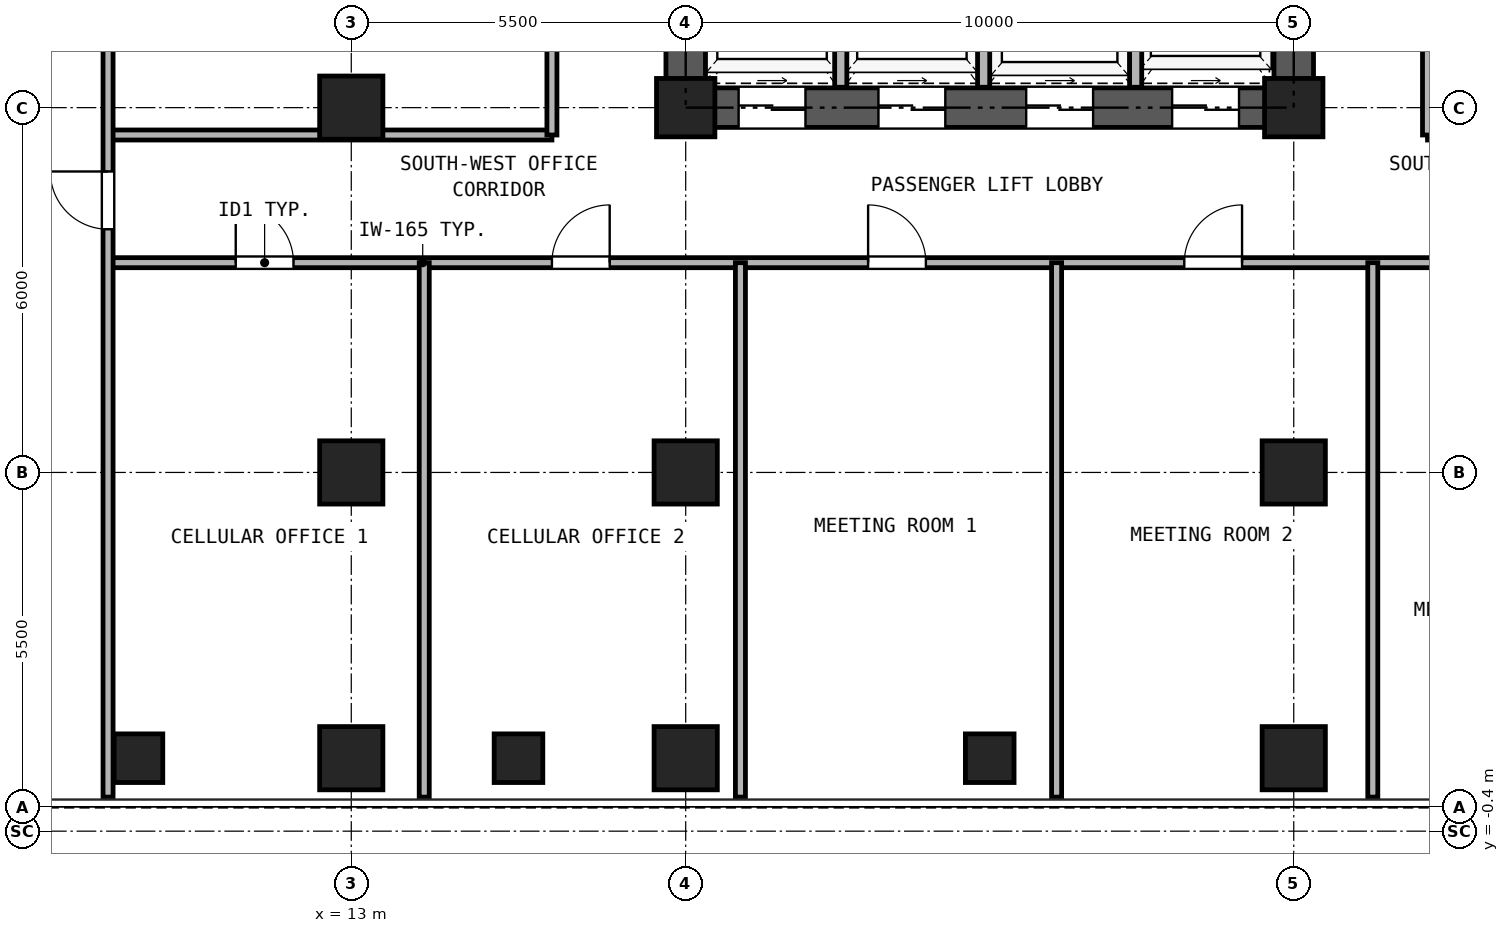
"""IFC4 building model, lengths in metres.
Left out: names, types, materials, properties, quantities, classifications, styles, units other than length and angle.
Written with IfcOpenShell. Run it as: python <this file> out.ifc"""

import sys

from ifc_helpers import new_model, si_unit, direction, frame, frame_2d, origin, origin_2d, place, context, subcontext, project, spatial, rectangle, hollow_rectangle, extrude, source, transform, mapped, element, fill, save


model = new_model("IFC4")
c1 = context("Model", 3, precision=1e-05, world=origin(), true_north=direction((0.0, 1.0)))
c2 = subcontext(c1, "Body", "Model", "MODEL_VIEW")
j1 = project(units=[si_unit("LENGTHUNIT", "METRE"), si_unit("PLANEANGLEUNIT", "RADIAN")], contexts=[c1])
p1 = place(None, origin())
s1 = spatial("IfcSite", under=j1, at=p1, CompositionType="ELEMENT")
p2 = place(p1, origin())
s2 = spatial("IfcBuilding", under=s1, at=p2, CompositionType="ELEMENT")
p3 = place(p2, frame((0.0, 0.0, 54.9)))
s3 = spatial("IfcBuildingStorey", under=s2, at=p3, CompositionType="ELEMENT", Elevation=54.9)
m1 = source(origin(), c2, "Body", "SweptSolid", [
    extrude(hollow_rectangle(XDim=1.04, YDim=1.04, WallThickness=0.065, at=origin_2d()), origin(), (0.0, 0.0, 1.0), 3.32),
])
for number, where, z_axis, x_axis in (
    (1, (13.0, 0.8, 0.0), (0.0, 0.0, 1.0), (1.0, 0.0, 0.0)),
    (2, (18.5, 0.8, 0.0), (0.0, 0.0, 1.0), (1.0, 0.0, 0.0)),
    (3, (28.5, 0.8, 0.0), (0.0, 0.0, 1.0), (1.0, 0.0, 0.0)),
    (4, (13.0, 5.5, 0.0), (0.0, 0.0, 1.0), (1.0, 0.0, 0.0)),
    (5, (13.0, 11.5, 0.0), (0.0, 0.0, 1.0), (1.0, 0.0, 0.0)),
    (6, (18.5, 5.5, 0.0), (0.0, 0.0, 1.0), (1.0, 0.0, 0.0)),
):
    element("IfcColumn", number, at=place(p3, frame(where, z_axis=z_axis, x_axis=x_axis)), inside=s3, PredefinedType="COLUMN", context=c2, shape_type="MappedRepresentation", body=[
        mapped(m1, transform((0.0, 0.0, 0.0), x_axis=(1.0, 0.0, 0.0), y_axis=(0.0, 1.0, 0.0), z_axis=(0.0, 0.0, 1.0), scale=1.0)),
    ])
m2 = source(origin(), c2, "Body", "SweptSolid", [
    extrude(hollow_rectangle(XDim=0.96, YDim=0.96, WallThickness=0.06, at=origin_2d()), origin(), (0.0, 0.0, 1.0), 3.32),
])
p4 = place(p3, frame((18.5, 11.5, 0.0), z_axis=(0.0, 0.0, 1.0), x_axis=(1.0, 0.0, 0.0)))
e7 = element("IfcColumn", 7, at=p4, inside=s3, PredefinedType="COLUMN", context=c2, shape_type="MappedRepresentation", body=[
    mapped(m2, transform((0.0, 0.0, 0.0), x_axis=(1.0, 0.0, 0.0), y_axis=(0.0, 1.0, 0.0), z_axis=(0.0, 0.0, 1.0), scale=1.0)),
])
p5 = place(p3, frame((28.5, 5.5, 0.0), z_axis=(0.0, 0.0, 1.0), x_axis=(1.0, 0.0, 0.0)))
e8 = element("IfcColumn", 8, at=p5, inside=s3, PredefinedType="COLUMN", context=c2, shape_type="MappedRepresentation", body=[
    mapped(m1, transform((0.0, 0.0, 0.0), x_axis=(1.0, 0.0, 0.0), y_axis=(0.0, 1.0, 0.0), z_axis=(0.0, 0.0, 1.0), scale=1.0)),
])
p6 = place(p3, frame((28.5, 11.5, 0.0), z_axis=(0.0, 0.0, 1.0), x_axis=(1.0, 0.0, 0.0)))
e9 = element("IfcColumn", 9, at=p6, inside=s3, PredefinedType="COLUMN", context=c2, shape_type="MappedRepresentation", body=[
    mapped(m2, transform((0.0, 0.0, 0.0), x_axis=(1.0, 0.0, 0.0), y_axis=(0.0, 1.0, 0.0), z_axis=(0.0, 0.0, 1.0), scale=1.0)),
])
m3 = source(origin(), c2, "Body", "SweptSolid", [
    extrude(hollow_rectangle(XDim=0.8, YDim=0.8, WallThickness=0.045, at=origin_2d()), origin(), (0.0, 0.0, 1.0), 3.32),
])
for number, where, z_axis, x_axis in (
    (10, (9.5, 0.8, 0.0), (0.0, 0.0, 1.0), (1.0, 0.0, 0.0)),
    (11, (15.75, 0.8, 0.0), (0.0, 0.0, 1.0), (1.0, 0.0, 0.0)),
    (12, (23.5, 0.8, 0.0), (0.0, 0.0, 1.0), (1.0, 0.0, 0.0)),
):
    element("IfcColumn", number, at=place(p3, frame(where, z_axis=z_axis, x_axis=x_axis)), inside=s3, PredefinedType="COLUMN", context=c2, shape_type="MappedRepresentation", body=[
        mapped(m3, transform((0.0, 0.0, 0.0), x_axis=(1.0, 0.0, 0.0), y_axis=(0.0, 1.0, 0.0), z_axis=(0.0, 0.0, 1.0), scale=1.0)),
    ])
p7 = place(p3, frame((18.175, 11.5, 0.0), z_axis=(0.0, 0.0, 1.0), x_axis=(1.0, 0.0, 0.0)))
e13 = element("IfcWall", 13, at=p7, inside=s3, PredefinedType="SHEAR", context=c2, shape_type="SweptSolid", body=[
    extrude(rectangle(XDim=10.65, YDim=0.65, at=frame_2d((5.325, 0.0))), origin(), (0.0, 0.0, 1.0), 3.32),
])
p8 = place(p7, frame((1.195, 0.0, 0.0)))
e14 = element("IfcOpeningElement", 14, at=p8, cuts=e13, PredefinedType="OPENING", context=c2, shape_type="SweptSolid", body=[
    extrude(rectangle(XDim=1.1, YDim=2.25, at=frame_2d((0.55, 1.125))), frame((0.0, 0.335, 0.0), z_axis=(0.0, -1.0, 0.0), x_axis=(1.0, 0.0, 0.0)), (0.0, 0.0, 1.0), 0.67),
])
p9 = place(p7, frame((3.495, 0.0, 0.0)))
e15 = element("IfcOpeningElement", 15, at=p9, cuts=e13, PredefinedType="OPENING", context=c2, shape_type="SweptSolid", body=[
    extrude(rectangle(XDim=1.1, YDim=2.25, at=frame_2d((0.55, 1.125))), frame((0.0, 0.335, 0.0), z_axis=(0.0, -1.0, 0.0), x_axis=(1.0, 0.0, 0.0)), (0.0, 0.0, 1.0), 0.67),
])
p10 = place(p7, frame((5.925, 0.0, 0.0)))
e16 = element("IfcOpeningElement", 16, at=p10, cuts=e13, PredefinedType="OPENING", context=c2, shape_type="SweptSolid", body=[
    extrude(rectangle(XDim=1.1, YDim=2.25, at=frame_2d((0.55, 1.125))), frame((0.0, 0.335, 0.0), z_axis=(0.0, -1.0, 0.0), x_axis=(1.0, 0.0, 0.0)), (0.0, 0.0, 1.0), 0.67),
])
p11 = place(p7, frame((8.325, 0.0, 0.0)))
e17 = element("IfcOpeningElement", 17, at=p11, cuts=e13, PredefinedType="OPENING", context=c2, shape_type="SweptSolid", body=[
    extrude(rectangle(XDim=1.1, YDim=2.25, at=frame_2d((0.55, 1.125))), frame((0.0, 0.335, 0.0), z_axis=(0.0, -1.0, 0.0), x_axis=(1.0, 0.0, 0.0)), (0.0, 0.0, 1.0), 0.67),
])
p12 = place(p3, frame((18.5, 11.825, 0.0), z_axis=(0.0, 0.0, 1.0), x_axis=(0.0, 1.0, 0.0)))
e18 = element("IfcWall", 18, at=p12, inside=s3, PredefinedType="SHEAR", context=c2, shape_type="SweptSolid", body=[
    extrude(rectangle(XDim=16.6, YDim=0.65, at=frame_2d((8.3, 0.0))), origin(), (0.0, 0.0, 1.0), 3.32),
])
p13 = place(p12, frame((7.325, 0.0, 0.0)))
e19 = element("IfcOpeningElement", 19, at=p13, cuts=e18, PredefinedType="OPENING", context=c2, shape_type="SweptSolid", body=[
    extrude(rectangle(XDim=1.15, YDim=2.2, at=frame_2d((0.575, 1.1))), frame((0.0, 0.335, 0.0), z_axis=(0.0, -1.0, 0.0), x_axis=(1.0, 0.0, 0.0)), (0.0, 0.0, 1.0), 0.67),
])
p14 = place(p3, frame((28.5, 11.825, 0.0), z_axis=(0.0, 0.0, 1.0), x_axis=(0.0, 1.0, 0.0)))
e20 = element("IfcWall", 20, at=p14, inside=s3, PredefinedType="SHEAR", context=c2, shape_type="SweptSolid", body=[
    extrude(rectangle(XDim=16.6, YDim=0.65, at=frame_2d((8.3, 0.0))), origin(), (0.0, 0.0, 1.0), 3.32),
])
p15 = place(p14, frame((7.325, 0.0, 0.0)))
e21 = element("IfcOpeningElement", 21, at=p15, cuts=e20, PredefinedType="OPENING", context=c2, shape_type="SweptSolid", body=[
    extrude(rectangle(XDim=1.15, YDim=2.2, at=frame_2d((0.575, 1.1))), frame((0.0, 0.335, 0.0), z_axis=(0.0, -1.0, 0.0), x_axis=(1.0, 0.0, 0.0)), (0.0, 0.0, 1.0), 0.67),
])
for number, where, z_axis, x_axis in (
    (22, (21.05, 11.835, 0.0), (0.0, 0.0, 1.0), (0.0, 1.0, 0.0)),
    (23, (23.4, 11.835, 0.0), (0.0, 0.0, 1.0), (0.0, 1.0, 0.0)),
    (24, (25.9, 11.835, 0.0), (0.0, 0.0, 1.0), (0.0, 1.0, 0.0)),
):
    element("IfcWall", number, at=place(p3, frame(where, z_axis=z_axis, x_axis=x_axis)), inside=s3, PredefinedType="PARTITIONING", context=c2, shape_type="SweptSolid", body=[
        extrude(rectangle(XDim=3.165, YDim=0.2, at=frame_2d((1.583, 0.0))), origin(), (0.0, 0.0, 1.0), 3.32),
    ])
p16 = place(p3, frame((9.0, 8.95, 0.0), z_axis=(0.0, 0.0, 1.0), x_axis=(1.0, 0.0, 0.0)))
e25 = element("IfcWall", 25, at=p16, inside=s3, PredefinedType="PARTITIONING", context=c2, shape_type="SweptSolid", body=[
    extrude(rectangle(XDim=29.0, YDim=0.165, at=frame_2d((14.5, 0.0))), origin(), (0.0, 0.0, 1.0), 3.32),
])
p17 = place(p16, frame((2.1, 0.0, 0.0)))
e26 = element("IfcOpeningElement", 26, at=p17, cuts=e25, PredefinedType="OPENING", context=c2, shape_type="SweptSolid", body=[
    extrude(rectangle(XDim=0.95, YDim=2.15, at=frame_2d((0.475, 1.075))), frame((0.0, 0.093, 0.0), z_axis=(0.0, -1.0, 0.0), x_axis=(1.0, 0.0, 0.0)), (0.0, 0.0, 1.0), 0.185),
])
p18 = place(p16, frame((7.3, 0.0, 0.0)))
e27 = element("IfcOpeningElement", 27, at=p18, cuts=e25, PredefinedType="OPENING", context=c2, shape_type="SweptSolid", body=[
    extrude(rectangle(XDim=0.95, YDim=2.15, at=frame_2d((0.475, 1.075))), frame((0.0, 0.093, 0.0), z_axis=(0.0, -1.0, 0.0), x_axis=(1.0, 0.0, 0.0)), (0.0, 0.0, 1.0), 0.185),
])
p19 = place(p16, frame((12.5, 0.0, 0.0)))
e28 = element("IfcOpeningElement", 28, at=p19, cuts=e25, PredefinedType="OPENING", context=c2, shape_type="SweptSolid", body=[
    extrude(rectangle(XDim=0.95, YDim=2.15, at=frame_2d((0.475, 1.075))), frame((0.0, 0.093, 0.0), z_axis=(0.0, -1.0, 0.0), x_axis=(1.0, 0.0, 0.0)), (0.0, 0.0, 1.0), 0.185),
])
p20 = place(p16, frame((17.7, 0.0, 0.0)))
e29 = element("IfcOpeningElement", 29, at=p20, cuts=e25, PredefinedType="OPENING", context=c2, shape_type="SweptSolid", body=[
    extrude(rectangle(XDim=0.95, YDim=2.15, at=frame_2d((0.475, 1.075))), frame((0.0, 0.093, 0.0), z_axis=(0.0, -1.0, 0.0), x_axis=(1.0, 0.0, 0.0)), (0.0, 0.0, 1.0), 0.185),
])
p21 = place(p16, frame((22.3, 0.0, 0.0)))
e30 = element("IfcOpeningElement", 30, at=p21, cuts=e25, PredefinedType="OPENING", context=c2, shape_type="SweptSolid", body=[
    extrude(rectangle(XDim=0.95, YDim=2.15, at=frame_2d((0.475, 1.075))), frame((0.0, 0.093, 0.0), z_axis=(0.0, -1.0, 0.0), x_axis=(1.0, 0.0, 0.0)), (0.0, 0.0, 1.0), 0.185),
])
p22 = place(p16, frame((25.4, 0.0, 0.0)))
e31 = element("IfcOpeningElement", 31, at=p22, cuts=e25, PredefinedType="OPENING", context=c2, shape_type="SweptSolid", body=[
    extrude(rectangle(XDim=0.92, YDim=2.1, at=frame_2d((0.46, 1.05))), frame((0.0, 0.093, 0.0), z_axis=(0.0, -1.0, 0.0), x_axis=(1.0, 0.0, 0.0)), (0.0, 0.0, 1.0), 0.185),
])
p23 = place(p16, frame((27.5, 0.0, 0.0)))
e32 = element("IfcOpeningElement", 32, at=p23, cuts=e25, PredefinedType="OPENING", context=c2, shape_type="SweptSolid", body=[
    extrude(rectangle(XDim=0.92, YDim=2.1, at=frame_2d((0.46, 1.05))), frame((0.0, 0.093, 0.0), z_axis=(0.0, -1.0, 0.0), x_axis=(1.0, 0.0, 0.0)), (0.0, 0.0, 1.0), 0.185),
])
for number, where, z_axis, x_axis in (
    (33, (9.0, 11.05, 0.0), (0.0, 0.0, 1.0), (1.0, 0.0, 0.0)),
    (34, (30.7, 11.05, 0.0), (0.0, 0.0, 1.0), (1.0, 0.0, 0.0)),
):
    element("IfcWall", number, at=place(p3, frame(where, z_axis=z_axis, x_axis=x_axis)), inside=s3, PredefinedType="PARTITIONING", context=c2, shape_type="SweptSolid", body=[
        extrude(rectangle(XDim=7.3, YDim=0.165, at=frame_2d((3.65, 0.0))), origin(), (0.0, 0.0, 1.0), 3.32),
    ])
p24 = place(p3, frame((16.3, 11.05, 0.0), z_axis=(0.0, 0.0, 1.0), x_axis=(0.0, 1.0, 0.0)))
e35 = element("IfcWall", 35, at=p24, inside=s3, PredefinedType="PARTITIONING", context=c2, shape_type="SweptSolid", body=[
    extrude(rectangle(XDim=18.25, YDim=0.165, at=frame_2d((9.125, 0.0))), origin(), (0.0, 0.0, 1.0), 3.32),
])
p25 = place(p24, frame((5.409, 0.0, 0.0)))
e36 = element("IfcOpeningElement", 36, at=p25, cuts=e35, PredefinedType="OPENING", context=c2, shape_type="SweptSolid", body=[
    extrude(rectangle(XDim=0.95, YDim=2.15, at=frame_2d((0.475, 1.075))), frame((0.0, 0.093, 0.0), z_axis=(0.0, -1.0, 0.0), x_axis=(1.0, 0.0, 0.0)), (0.0, 0.0, 1.0), 0.185),
])
p26 = place(p24, frame((14.534, 0.0, 0.0)))
e37 = element("IfcOpeningElement", 37, at=p26, cuts=e35, PredefinedType="OPENING", context=c2, shape_type="SweptSolid", body=[
    extrude(rectangle(XDim=0.95, YDim=2.15, at=frame_2d((0.475, 1.075))), frame((0.0, 0.093, 0.0), z_axis=(0.0, -1.0, 0.0), x_axis=(1.0, 0.0, 0.0)), (0.0, 0.0, 1.0), 0.185),
])
p27 = place(p3, frame((30.7, 11.05, 0.0), z_axis=(0.0, 0.0, 1.0), x_axis=(0.0, 1.0, 0.0)))
e38 = element("IfcWall", 38, at=p27, inside=s3, PredefinedType="PARTITIONING", context=c2, shape_type="SweptSolid", body=[
    extrude(rectangle(XDim=18.25, YDim=0.165, at=frame_2d((9.125, 0.0))), origin(), (0.0, 0.0, 1.0), 3.32),
])
p28 = place(p27, frame((8.625, 0.0, 0.0)))
e39 = element("IfcOpeningElement", 39, at=p28, cuts=e38, PredefinedType="OPENING", context=c2, shape_type="SweptSolid", body=[
    extrude(rectangle(XDim=0.95, YDim=2.15, at=frame_2d((0.475, 1.075))), frame((0.0, 0.093, 0.0), z_axis=(0.0, -1.0, 0.0), x_axis=(1.0, 0.0, 0.0)), (0.0, 0.0, 1.0), 0.185),
])
p29 = place(p3, frame((9.0, 0.16, 0.0), z_axis=(0.0, 0.0, 1.0), x_axis=(0.0, 1.0, 0.0)))
e40 = element("IfcWall", 40, at=p29, inside=s3, PredefinedType="PARTITIONING", context=c2, shape_type="SweptSolid", body=[
    extrude(rectangle(XDim=40.18, YDim=0.165, at=frame_2d((20.09, 0.0))), origin(), (0.0, 0.0, 1.0), 3.32),
])
p30 = place(p29, frame((9.34, 0.0, 0.0)))
e41 = element("IfcOpeningElement", 41, at=p30, cuts=e40, PredefinedType="OPENING", context=c2, shape_type="SweptSolid", body=[
    extrude(rectangle(XDim=0.95, YDim=2.15, at=frame_2d((0.475, 1.075))), frame((0.0, 0.093, 0.0), z_axis=(0.0, -1.0, 0.0), x_axis=(1.0, 0.0, 0.0)), (0.0, 0.0, 1.0), 0.185),
])
p31 = place(p29, frame((29.69, 0.0, 0.0)))
e42 = element("IfcOpeningElement", 42, at=p31, cuts=e40, PredefinedType="OPENING", context=c2, shape_type="SweptSolid", body=[
    extrude(rectangle(XDim=0.95, YDim=2.15, at=frame_2d((0.475, 1.075))), frame((0.0, 0.093, 0.0), z_axis=(0.0, -1.0, 0.0), x_axis=(1.0, 0.0, 0.0)), (0.0, 0.0, 1.0), 0.185),
])
for number, where, z_axis, x_axis in (
    (43, (14.2, 0.16, 0.0), (0.0, 0.0, 1.0), (0.0, 1.0, 0.0)),
    (44, (19.4, 0.16, 0.0), (0.0, 0.0, 1.0), (0.0, 1.0, 0.0)),
    (45, (24.6, 0.16, 0.0), (0.0, 0.0, 1.0), (0.0, 1.0, 0.0)),
    (46, (29.8, 0.16, 0.0), (0.0, 0.0, 1.0), (0.0, 1.0, 0.0)),
):
    element("IfcWall", number, at=place(p3, frame(where, z_axis=z_axis, x_axis=x_axis)), inside=s3, PredefinedType="PARTITIONING", context=c2, shape_type="SweptSolid", body=[
        extrude(rectangle(XDim=8.79, YDim=0.165, at=frame_2d((4.395, 0.0))), origin(), (0.0, 0.0, 1.0), 3.32),
    ])
p32 = place(p8, frame((1.1, 0.0, 0.0), z_axis=(0.0, 0.0, 1.0), x_axis=(-1.0, 0.0, 0.0)))
e47 = element("IfcDoor", 47, at=p32, inside=s3, OperationType="DOUBLE_DOOR_SLIDING", PredefinedType="DOOR", context=c2, shape_type="SweptSolid", body=[
    extrude(rectangle(XDim=1.1, YDim=2.25, at=frame_2d((0.55, 1.125))), frame((0.0, 0.025, 0.0), z_axis=(0.0, -1.0, 0.0), x_axis=(1.0, 0.0, 0.0)), (0.0, 0.0, 1.0), 0.05),
])
fill(e14, e47)
p33 = place(p9, frame((1.1, 0.0, 0.0), z_axis=(0.0, 0.0, 1.0), x_axis=(-1.0, 0.0, 0.0)))
e48 = element("IfcDoor", 48, at=p33, inside=s3, OperationType="DOUBLE_DOOR_SLIDING", PredefinedType="DOOR", context=c2, shape_type="SweptSolid", body=[
    extrude(rectangle(XDim=1.1, YDim=2.25, at=frame_2d((0.55, 1.125))), frame((0.0, 0.025, 0.0), z_axis=(0.0, -1.0, 0.0), x_axis=(1.0, 0.0, 0.0)), (0.0, 0.0, 1.0), 0.05),
])
fill(e15, e48)
p34 = place(p10, frame((1.1, 0.0, 0.0), z_axis=(0.0, 0.0, 1.0), x_axis=(-1.0, 0.0, 0.0)))
e49 = element("IfcDoor", 49, at=p34, inside=s3, OperationType="DOUBLE_DOOR_SLIDING", PredefinedType="DOOR", context=c2, shape_type="SweptSolid", body=[
    extrude(rectangle(XDim=1.1, YDim=2.25, at=frame_2d((0.55, 1.125))), frame((0.0, 0.025, 0.0), z_axis=(0.0, -1.0, 0.0), x_axis=(1.0, 0.0, 0.0)), (0.0, 0.0, 1.0), 0.05),
])
fill(e16, e49)
p35 = place(p11, frame((1.1, 0.0, 0.0), z_axis=(0.0, 0.0, 1.0), x_axis=(-1.0, 0.0, 0.0)))
e50 = element("IfcDoor", 50, at=p35, inside=s3, OperationType="DOUBLE_DOOR_SLIDING", PredefinedType="DOOR", context=c2, shape_type="SweptSolid", body=[
    extrude(rectangle(XDim=1.1, YDim=2.25, at=frame_2d((0.55, 1.125))), frame((0.0, 0.025, 0.0), z_axis=(0.0, -1.0, 0.0), x_axis=(1.0, 0.0, 0.0)), (0.0, 0.0, 1.0), 0.05),
])
fill(e17, e50)
p36 = place(p17, frame((0.95, 0.0, 0.0), z_axis=(0.0, 0.0, 1.0), x_axis=(-1.0, 0.0, 0.0)))
e51 = element("IfcDoor", 51, at=p36, inside=s3, OperationType="SINGLE_SWING_LEFT", PredefinedType="DOOR", context=c2, shape_type="SweptSolid", body=[
    extrude(rectangle(XDim=0.95, YDim=2.15, at=frame_2d((0.475, 1.075))), frame((0.0, 0.025, 0.0), z_axis=(0.0, -1.0, 0.0), x_axis=(1.0, 0.0, 0.0)), (0.0, 0.0, 1.0), 0.05),
])
fill(e26, e51)
p37 = place(p18, frame((0.95, 0.0, 0.0), z_axis=(0.0, 0.0, 1.0), x_axis=(-1.0, 0.0, 0.0)))
e52 = element("IfcDoor", 52, at=p37, inside=s3, OperationType="SINGLE_SWING_RIGHT", PredefinedType="DOOR", context=c2, shape_type="SweptSolid", body=[
    extrude(rectangle(XDim=0.95, YDim=2.15, at=frame_2d((0.475, 1.075))), frame((0.0, 0.025, 0.0), z_axis=(0.0, -1.0, 0.0), x_axis=(1.0, 0.0, 0.0)), (0.0, 0.0, 1.0), 0.05),
])
fill(e27, e52)
p38 = place(p19, frame((0.95, 0.0, 0.0), z_axis=(0.0, 0.0, 1.0), x_axis=(-1.0, 0.0, 0.0)))
e53 = element("IfcDoor", 53, at=p38, inside=s3, OperationType="SINGLE_SWING_LEFT", PredefinedType="DOOR", context=c2, shape_type="SweptSolid", body=[
    extrude(rectangle(XDim=0.95, YDim=2.15, at=frame_2d((0.475, 1.075))), frame((0.0, 0.025, 0.0), z_axis=(0.0, -1.0, 0.0), x_axis=(1.0, 0.0, 0.0)), (0.0, 0.0, 1.0), 0.05),
])
fill(e28, e53)
p39 = place(p20, frame((0.95, 0.0, 0.0), z_axis=(0.0, 0.0, 1.0), x_axis=(-1.0, 0.0, 0.0)))
e54 = element("IfcDoor", 54, at=p39, inside=s3, OperationType="SINGLE_SWING_RIGHT", PredefinedType="DOOR", context=c2, shape_type="SweptSolid", body=[
    extrude(rectangle(XDim=0.95, YDim=2.15, at=frame_2d((0.475, 1.075))), frame((0.0, 0.025, 0.0), z_axis=(0.0, -1.0, 0.0), x_axis=(1.0, 0.0, 0.0)), (0.0, 0.0, 1.0), 0.05),
])
fill(e29, e54)
p40 = place(p30, frame((0.95, 0.0, 0.0), z_axis=(0.0, 0.0, 1.0), x_axis=(-1.0, 0.0, 0.0)))
e55 = element("IfcDoor", 55, at=p40, inside=s3, OperationType="SINGLE_SWING_RIGHT", PredefinedType="DOOR", context=c2, shape_type="SweptSolid", body=[
    extrude(rectangle(XDim=0.95, YDim=2.15, at=frame_2d((0.475, 1.075))), frame((0.0, 0.025, 0.0), z_axis=(0.0, -1.0, 0.0), x_axis=(1.0, 0.0, 0.0)), (0.0, 0.0, 1.0), 0.05),
])
fill(e41, e55)
save(model, sys.argv[1])
